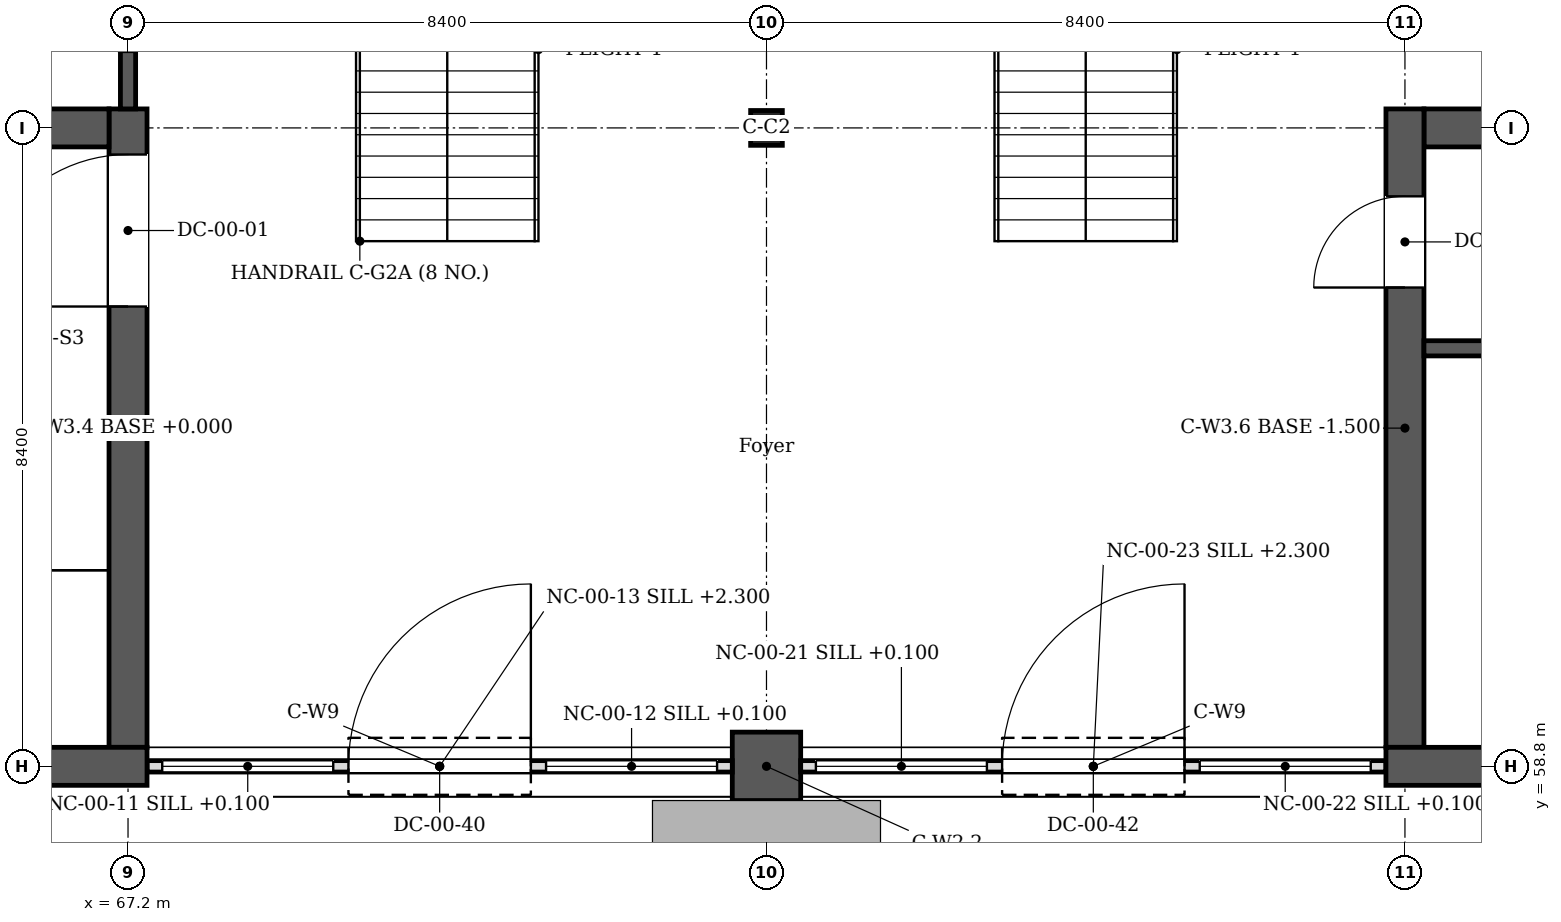
"""IFC4 building model, lengths in metres.
Left out: names, types, materials, properties, quantities, classifications, styles, units other than length and angle.
Written with IfcOpenShell. Run it as: python <this file> out.ifc"""

import sys

from ifc_helpers import new_model, si_unit, direction, frame, frame_2d, origin, origin_2d, place, context, subcontext, project, spatial, rectangle, i_section, extrude, element, fill, save


model = new_model("IFC4")
c1 = context("Model", 3, precision=1e-05, world=origin(), true_north=direction((0.0, 1.0)))
c2 = subcontext(c1, "Body", "Model", "MODEL_VIEW")
j1 = project(units=[si_unit("LENGTHUNIT", "METRE"), si_unit("PLANEANGLEUNIT", "RADIAN")], contexts=[c1])
p1 = place(None, origin())
s1 = spatial("IfcSite", under=j1, at=p1, CompositionType="ELEMENT")
p2 = place(p1, origin())
s2 = spatial("IfcBuilding", under=s1, at=p2, CompositionType="ELEMENT")
p3 = place(p2, origin())
s3 = spatial("IfcBuildingStorey", under=s2, at=p3, CompositionType="ELEMENT", Elevation=0.0)
for number, where, z_axis, x_axis in (
    (1, (67.45, 58.8, 0.0), (0.0, 0.0, 1.0), (-1.0, 0.0, 0.0)),
    (2, (92.65, 58.8, 0.0), (0.0, 0.0, 1.0), (-1.0, 0.0, 0.0)),
):
    element("IfcWall", number, at=place(p3, frame(where, z_axis=z_axis, x_axis=x_axis)), inside=s3, PredefinedType="SOLIDWALL", context=c2, shape_type="SweptSolid", body=[
        extrude(rectangle(XDim=8.9, YDim=0.5, at=frame_2d((4.45, 0.0))), origin(), (0.0, 0.0, 1.0), 6.0),
    ])
p4 = place(p3, frame((75.15, 58.8, 0.0), z_axis=(0.0, 0.0, 1.0), x_axis=(1.0, 0.0, 0.0)))
e3 = element("IfcWall", 3, at=p4, inside=s3, PredefinedType="SOLIDWALL", context=c2, shape_type="SweptSolid", body=[
    extrude(rectangle(XDim=0.9, YDim=0.9, at=frame_2d((0.45, 0.0))), origin(), (0.0, 0.0, 1.0), 6.0),
])
p5 = place(p3, frame((75.6, 67.2, 0.0), z_axis=(0.0, 0.0, 1.0), x_axis=(1.0, 0.0, 0.0)))
e4 = element("IfcColumn", 4, at=p5, inside=s3, PredefinedType="COLUMN", context=c2, shape_type="SweptSolid", body=[
    extrude(i_section(OverallWidth=0.417, OverallDepth=0.458, WebThickness=0.03, FlangeThickness=0.05, FilletRadius=0.022, at=origin_2d()), origin(), (0.0, 0.0, 1.0), 6.0),
])
p6 = place(p3, frame((67.45, 58.8, 0.0), z_axis=(0.0, 0.0, 1.0), x_axis=(1.0, 0.0, 0.0)))
e5 = element("IfcWall", 5, at=p6, inside=s3, PredefinedType="SOLIDWALL", context=c2, shape_type="SweptSolid", body=[
    extrude(rectangle(XDim=7.7, YDim=0.15, at=frame_2d((3.85, 0.0))), origin(), (0.0, 0.0, 1.0), 6.0),
])
p7 = place(p6, frame((2.65, 0.0, 0.0)))
e6 = element("IfcOpeningElement", 6, at=p7, cuts=e5, PredefinedType="OPENING", context=c2, shape_type="SweptSolid", body=[
    extrude(rectangle(XDim=2.4, YDim=2.1, at=frame_2d((1.2, 1.05))), frame((0.0, 0.085, 0.0), z_axis=(0.0, -1.0, 0.0), x_axis=(1.0, 0.0, 0.0)), (0.0, 0.0, 1.0), 0.17),
])
p8 = place(p6, frame((0.2, 0.0, 0.1)))
e7 = element("IfcOpeningElement", 7, at=p8, cuts=e5, PredefinedType="OPENING", context=c2, shape_type="SweptSolid", body=[
    extrude(rectangle(XDim=2.25, YDim=5.0, at=frame_2d((1.125, 2.5))), frame((0.0, 0.085, 0.0), z_axis=(0.0, -1.0, 0.0), x_axis=(1.0, 0.0, 0.0)), (0.0, 0.0, 1.0), 0.17),
])
p9 = place(p6, frame((5.25, 0.0, 0.1)))
e8 = element("IfcOpeningElement", 8, at=p9, cuts=e5, PredefinedType="OPENING", context=c2, shape_type="SweptSolid", body=[
    extrude(rectangle(XDim=2.25, YDim=5.0, at=frame_2d((1.125, 2.5))), frame((0.0, 0.085, 0.0), z_axis=(0.0, -1.0, 0.0), x_axis=(1.0, 0.0, 0.0)), (0.0, 0.0, 1.0), 0.17),
])
p10 = place(p6, frame((2.65, 0.0, 2.3)))
e9 = element("IfcOpeningElement", 9, at=p10, cuts=e5, PredefinedType="OPENING", context=c2, shape_type="SweptSolid", body=[
    extrude(rectangle(XDim=2.4, YDim=3.4, at=frame_2d((1.2, 1.7))), frame((0.0, 0.085, 0.0), z_axis=(0.0, -1.0, 0.0), x_axis=(1.0, 0.0, 0.0)), (0.0, 0.0, 1.0), 0.17),
])
p11 = place(p3, frame((76.05, 58.8, 0.0), z_axis=(0.0, 0.0, 1.0), x_axis=(1.0, 0.0, 0.0)))
e10 = element("IfcWall", 10, at=p11, inside=s3, PredefinedType="SOLIDWALL", context=c2, shape_type="SweptSolid", body=[
    extrude(rectangle(XDim=7.7, YDim=0.15, at=frame_2d((3.85, 0.0))), origin(), (0.0, 0.0, 1.0), 6.0),
])
p12 = place(p11, frame((2.65, 0.0, 0.0)))
e11 = element("IfcOpeningElement", 11, at=p12, cuts=e10, PredefinedType="OPENING", context=c2, shape_type="SweptSolid", body=[
    extrude(rectangle(XDim=2.4, YDim=2.1, at=frame_2d((1.2, 1.05))), frame((0.0, 0.085, 0.0), z_axis=(0.0, -1.0, 0.0), x_axis=(1.0, 0.0, 0.0)), (0.0, 0.0, 1.0), 0.17),
])
p13 = place(p11, frame((0.2, 0.0, 0.1)))
e12 = element("IfcOpeningElement", 12, at=p13, cuts=e10, PredefinedType="OPENING", context=c2, shape_type="SweptSolid", body=[
    extrude(rectangle(XDim=2.25, YDim=5.0, at=frame_2d((1.125, 2.5))), frame((0.0, 0.085, 0.0), z_axis=(0.0, -1.0, 0.0), x_axis=(1.0, 0.0, 0.0)), (0.0, 0.0, 1.0), 0.17),
])
p14 = place(p11, frame((5.25, 0.0, 0.1)))
e13 = element("IfcOpeningElement", 13, at=p14, cuts=e10, PredefinedType="OPENING", context=c2, shape_type="SweptSolid", body=[
    extrude(rectangle(XDim=2.25, YDim=5.0, at=frame_2d((1.125, 2.5))), frame((0.0, 0.085, 0.0), z_axis=(0.0, -1.0, 0.0), x_axis=(1.0, 0.0, 0.0)), (0.0, 0.0, 1.0), 0.17),
])
p15 = place(p11, frame((2.65, 0.0, 2.3)))
e14 = element("IfcOpeningElement", 14, at=p15, cuts=e10, PredefinedType="OPENING", context=c2, shape_type="SweptSolid", body=[
    extrude(rectangle(XDim=2.4, YDim=3.4, at=frame_2d((1.2, 1.7))), frame((0.0, 0.085, 0.0), z_axis=(0.0, -1.0, 0.0), x_axis=(1.0, 0.0, 0.0)), (0.0, 0.0, 1.0), 0.17),
])
p16 = place(p3, frame((67.2, 59.05, 0.0), z_axis=(0.0, 0.0, 1.0), x_axis=(0.0, 1.0, 0.0)))
e15 = element("IfcWall", 15, at=p16, inside=s3, PredefinedType="SOLIDWALL", context=c2, shape_type="SweptSolid", body=[
    extrude(rectangle(XDim=8.4, YDim=0.5, at=frame_2d((4.2, 0.0))), origin(), (0.0, 0.0, 1.0), 6.0),
])
p17 = place(p16, frame((5.8, 0.0, 0.0)))
e16 = element("IfcOpeningElement", 16, at=p17, cuts=e15, PredefinedType="OPENING", context=c2, shape_type="SweptSolid", body=[
    extrude(rectangle(XDim=2.0, YDim=2.1, at=frame_2d((1.0, 1.05))), frame((0.0, 0.26, 0.0), z_axis=(0.0, -1.0, 0.0), x_axis=(1.0, 0.0, 0.0)), (0.0, 0.0, 1.0), 0.52),
])
p18 = place(p3, frame((59.05, 67.2, 0.0), z_axis=(0.0, 0.0, 1.0), x_axis=(1.0, 0.0, 0.0)))
e17 = element("IfcWall", 17, at=p18, inside=s3, PredefinedType="SOLIDWALL", context=c2, shape_type="SweptSolid", body=[
    extrude(rectangle(XDim=7.9, YDim=0.5, at=frame_2d((3.95, 0.0))), origin(), (0.0, 0.0, 1.0), 6.0),
])
p19 = place(p3, frame((84.0, 59.05, -1.5), z_axis=(0.0, 0.0, 1.0), x_axis=(0.0, 1.0, 0.0)))
e18 = element("IfcWall", 18, at=p19, inside=s3, PredefinedType="SOLIDWALL", context=c2, shape_type="SweptSolid", body=[
    extrude(rectangle(XDim=8.4, YDim=0.5, at=frame_2d((4.2, 0.0))), origin(), (0.0, 0.0, 1.0), 7.5),
])
p20 = place(p19, frame((6.05, 0.0, 1.5)))
e19 = element("IfcOpeningElement", 19, at=p20, cuts=e18, PredefinedType="OPENING", context=c2, shape_type="SweptSolid", body=[
    extrude(rectangle(XDim=1.2, YDim=2.1, at=frame_2d((0.6, 1.05))), frame((0.0, 0.26, 0.0), z_axis=(0.0, -1.0, 0.0), x_axis=(1.0, 0.0, 0.0)), (0.0, 0.0, 1.0), 0.52),
])
p21 = place(p3, frame((84.25, 67.2, -1.5), z_axis=(0.0, 0.0, 1.0), x_axis=(1.0, 0.0, 0.0)))
e20 = element("IfcWall", 20, at=p21, inside=s3, PredefinedType="SOLIDWALL", context=c2, shape_type="SweptSolid", body=[
    extrude(rectangle(XDim=7.9, YDim=0.5, at=frame_2d((3.95, 0.0))), origin(), (0.0, 0.0, 1.0), 7.5),
])
p22 = place(p3, frame((84.25, 64.3, -1.5), z_axis=(0.0, 0.0, 1.0), x_axis=(1.0, 0.0, 0.0)))
e21 = element("IfcWall", 21, at=p22, inside=s3, PredefinedType="PARTITIONING", context=c2, shape_type="SweptSolid", body=[
    extrude(rectangle(XDim=7.9, YDim=0.2, at=frame_2d((3.95, 0.0))), origin(), (0.0, 0.0, 1.0), 7.5),
])
p23 = place(p22, frame((1.375, 0.0, 1.5)))
e22 = element("IfcOpeningElement", 22, at=p23, cuts=e21, PredefinedType="OPENING", context=c2, shape_type="SweptSolid", body=[
    extrude(rectangle(XDim=1.1, YDim=2.1, at=frame_2d((0.55, 1.05))), frame((0.0, 0.11, 0.0), z_axis=(0.0, -1.0, 0.0), x_axis=(1.0, 0.0, 0.0)), (0.0, 0.0, 1.0), 0.22),
])
p24 = place(p22, frame((5.425, 0.0, 1.5)))
e23 = element("IfcOpeningElement", 23, at=p24, cuts=e21, PredefinedType="OPENING", context=c2, shape_type="SweptSolid", body=[
    extrude(rectangle(XDim=1.1, YDim=2.1, at=frame_2d((0.55, 1.05))), frame((0.0, 0.11, 0.0), z_axis=(0.0, -1.0, 0.0), x_axis=(1.0, 0.0, 0.0)), (0.0, 0.0, 1.0), 0.22),
])
p25 = place(p3, frame((67.2, 67.45, 0.0), z_axis=(0.0, 0.0, 1.0), x_axis=(0.0, 1.0, 0.0)))
e24 = element("IfcWall", 24, at=p25, inside=s3, PredefinedType="PARTITIONING", context=c2, shape_type="SweptSolid", body=[
    extrude(rectangle(XDim=7.9, YDim=0.2, at=frame_2d((3.95, 0.0))), origin(), (0.0, 0.0, 1.0), 6.0),
])
p26 = place(p25, frame((0.75, 0.0, 0.0)))
e25 = element("IfcOpeningElement", 25, at=p26, cuts=e24, PredefinedType="OPENING", context=c2, shape_type="SweptSolid", body=[
    extrude(rectangle(XDim=1.8, YDim=2.1, at=frame_2d((0.9, 1.05))), frame((0.0, 0.11, 0.0), z_axis=(0.0, -1.0, 0.0), x_axis=(1.0, 0.0, 0.0)), (0.0, 0.0, 1.0), 0.22),
])
p27 = place(p7, origin())
e26 = element("IfcDoor", 26, at=p27, inside=s3, OperationType="DOUBLE_DOOR_DOUBLE_SWING", PredefinedType="DOOR", context=c2, shape_type="SweptSolid", body=[
    extrude(rectangle(XDim=2.4, YDim=2.1, at=frame_2d((1.2, 1.05))), frame((0.0, 0.025, 0.0), z_axis=(0.0, -1.0, 0.0), x_axis=(1.0, 0.0, 0.0)), (0.0, 0.0, 1.0), 0.05),
])
fill(e6, e26)
p28 = place(p8, origin())
e27 = element("IfcWindow", 27, at=p28, inside=s3, PartitioningType="SINGLE_PANEL", PredefinedType="WINDOW", context=c2, shape_type="SweptSolid", body=[
    extrude(rectangle(XDim=2.25, YDim=5.0, at=frame_2d((1.125, 2.5))), frame((0.0, 0.03, 0.0), z_axis=(0.0, -1.0, 0.0), x_axis=(1.0, 0.0, 0.0)), (0.0, 0.0, 1.0), 0.06),
])
fill(e7, e27)
p29 = place(p9, origin())
e28 = element("IfcWindow", 28, at=p29, inside=s3, PartitioningType="SINGLE_PANEL", PredefinedType="WINDOW", context=c2, shape_type="SweptSolid", body=[
    extrude(rectangle(XDim=2.25, YDim=5.0, at=frame_2d((1.125, 2.5))), frame((0.0, 0.03, 0.0), z_axis=(0.0, -1.0, 0.0), x_axis=(1.0, 0.0, 0.0)), (0.0, 0.0, 1.0), 0.06),
])
fill(e8, e28)
p30 = place(p10, origin())
e29 = element("IfcWindow", 29, at=p30, inside=s3, PartitioningType="SINGLE_PANEL", PredefinedType="WINDOW", context=c2, shape_type="SweptSolid", body=[
    extrude(rectangle(XDim=2.4, YDim=3.4, at=frame_2d((1.2, 1.7))), frame((0.0, 0.03, 0.0), z_axis=(0.0, -1.0, 0.0), x_axis=(1.0, 0.0, 0.0)), (0.0, 0.0, 1.0), 0.06),
])
fill(e9, e29)
p31 = place(p12, origin())
e30 = element("IfcDoor", 30, at=p31, inside=s3, OperationType="DOUBLE_DOOR_DOUBLE_SWING", PredefinedType="DOOR", context=c2, shape_type="SweptSolid", body=[
    extrude(rectangle(XDim=2.4, YDim=2.1, at=frame_2d((1.2, 1.05))), frame((0.0, 0.025, 0.0), z_axis=(0.0, -1.0, 0.0), x_axis=(1.0, 0.0, 0.0)), (0.0, 0.0, 1.0), 0.05),
])
fill(e11, e30)
p32 = place(p13, origin())
e31 = element("IfcWindow", 31, at=p32, inside=s3, PartitioningType="SINGLE_PANEL", PredefinedType="WINDOW", context=c2, shape_type="SweptSolid", body=[
    extrude(rectangle(XDim=2.25, YDim=5.0, at=frame_2d((1.125, 2.5))), frame((0.0, 0.03, 0.0), z_axis=(0.0, -1.0, 0.0), x_axis=(1.0, 0.0, 0.0)), (0.0, 0.0, 1.0), 0.06),
])
fill(e12, e31)
p33 = place(p14, origin())
e32 = element("IfcWindow", 32, at=p33, inside=s3, PartitioningType="SINGLE_PANEL", PredefinedType="WINDOW", context=c2, shape_type="SweptSolid", body=[
    extrude(rectangle(XDim=2.25, YDim=5.0, at=frame_2d((1.125, 2.5))), frame((0.0, 0.03, 0.0), z_axis=(0.0, -1.0, 0.0), x_axis=(1.0, 0.0, 0.0)), (0.0, 0.0, 1.0), 0.06),
])
fill(e13, e32)
p34 = place(p15, origin())
e33 = element("IfcWindow", 33, at=p34, inside=s3, PartitioningType="SINGLE_PANEL", PredefinedType="WINDOW", context=c2, shape_type="SweptSolid", body=[
    extrude(rectangle(XDim=2.4, YDim=3.4, at=frame_2d((1.2, 1.7))), frame((0.0, 0.03, 0.0), z_axis=(0.0, -1.0, 0.0), x_axis=(1.0, 0.0, 0.0)), (0.0, 0.0, 1.0), 0.06),
])
fill(e14, e33)
p35 = place(p17, origin())
e34 = element("IfcDoor", 34, at=p35, inside=s3, OperationType="DOUBLE_DOOR_DOUBLE_SWING", PredefinedType="DOOR", context=c2, shape_type="SweptSolid", body=[
    extrude(rectangle(XDim=2.0, YDim=2.1, at=frame_2d((1.0, 1.05))), frame((0.0, 0.025, 0.0), z_axis=(0.0, -1.0, 0.0), x_axis=(1.0, 0.0, 0.0)), (0.0, 0.0, 1.0), 0.05),
])
fill(e16, e34)
p36 = place(p20, origin())
e35 = element("IfcDoor", 35, at=p36, inside=s3, OperationType="SINGLE_SWING_LEFT", PredefinedType="DOOR", context=c2, shape_type="SweptSolid", body=[
    extrude(rectangle(XDim=1.2, YDim=2.1, at=frame_2d((0.6, 1.05))), frame((0.0, 0.025, 0.0), z_axis=(0.0, -1.0, 0.0), x_axis=(1.0, 0.0, 0.0)), (0.0, 0.0, 1.0), 0.05),
])
fill(e19, e35)
p37 = place(p26, origin())
e36 = element("IfcDoor", 36, at=p37, inside=s3, OperationType="DOUBLE_DOOR_DOUBLE_SWING", PredefinedType="DOOR", context=c2, shape_type="SweptSolid", body=[
    extrude(rectangle(XDim=1.8, YDim=2.1, at=frame_2d((0.9, 1.05))), frame((0.0, 0.025, 0.0), z_axis=(0.0, -1.0, 0.0), x_axis=(1.0, 0.0, 0.0)), (0.0, 0.0, 1.0), 0.05),
])
fill(e25, e36)
save(model, sys.argv[1])
